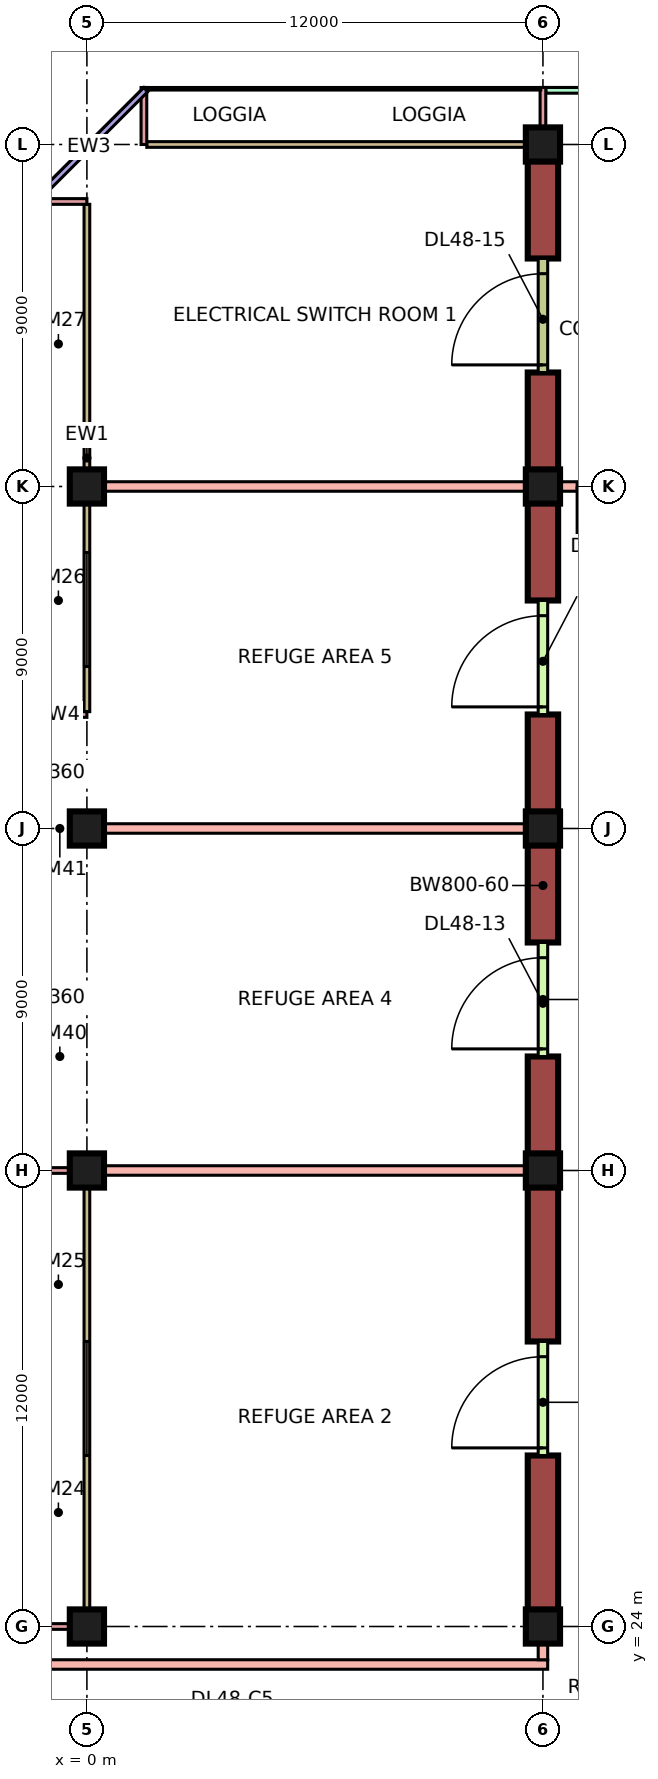
"""IFC4 building model, lengths in metres.
Left out: names, types, materials, properties, quantities, classifications, styles, units other than length and angle.
Written with IfcOpenShell. Run it as: python <this file> out.ifc"""

import sys

from ifc_helpers import new_model, si_unit, direction, frame, frame_2d, origin, origin_2d, place, context, subcontext, project, spatial, rectangle, extrude, element, fill, save


model = new_model("IFC4")
c1 = context("Model", 3, precision=1e-05, world=origin(), true_north=direction((0.0, 1.0)))
c2 = subcontext(c1, "Body", "Model", "MODEL_VIEW")
j1 = project(units=[si_unit("LENGTHUNIT", "METRE"), si_unit("PLANEANGLEUNIT", "RADIAN")], contexts=[c1])
p1 = place(None, origin())
s1 = spatial("IfcSite", under=j1, at=p1, CompositionType="ELEMENT")
p2 = place(p1, origin())
s2 = spatial("IfcBuilding", under=s1, at=p2, CompositionType="ELEMENT")
p3 = place(p2, frame((0.0, 0.0, 206.15)))
s3 = spatial("IfcBuildingStorey", under=s2, at=p3, CompositionType="ELEMENT", Elevation=206.15)
p4 = place(p3, frame((0.0, 24.0, 0.0), z_axis=(0.0, 0.0, 1.0), x_axis=(1.0, 0.0, 0.0)))
e1 = element("IfcColumn", 1, at=p4, inside=s3, PredefinedType="COLUMN", context=c2, shape_type="SweptSolid", body=[
    extrude(rectangle(XDim=0.9, YDim=0.9, at=origin_2d()), origin(), (0.0, 0.0, 1.0), 5.5),
])
p5 = place(p3, frame((0.0, 36.0, 0.0), z_axis=(0.0, 0.0, 1.0), x_axis=(1.0, 0.0, 0.0)))
e2 = element("IfcColumn", 2, at=p5, inside=s3, PredefinedType="COLUMN", context=c2, shape_type="SweptSolid", body=[
    extrude(rectangle(XDim=0.9, YDim=0.9, at=origin_2d()), origin(), (0.0, 0.0, 1.0), 5.5),
])
p6 = place(p3, frame((0.0, 45.0, 0.0), z_axis=(0.0, 0.0, 1.0), x_axis=(1.0, 0.0, 0.0)))
e3 = element("IfcColumn", 3, at=p6, inside=s3, PredefinedType="COLUMN", context=c2, shape_type="SweptSolid", body=[
    extrude(rectangle(XDim=0.9, YDim=0.9, at=origin_2d()), origin(), (0.0, 0.0, 1.0), 5.5),
])
for number, where, z_axis, x_axis in (
    (4, (0.0, 54.0, 0.0), (0.0, 0.0, 1.0), (1.0, 0.0, 0.0)),
    (5, (12.0, 24.0, 0.0), (0.0, 0.0, 1.0), (1.0, 0.0, 0.0)),
    (6, (12.0, 36.0, 0.0), (0.0, 0.0, 1.0), (1.0, 0.0, 0.0)),
    (7, (12.0, 45.0, 0.0), (0.0, 0.0, 1.0), (1.0, 0.0, 0.0)),
    (8, (12.0, 54.0, 0.0), (0.0, 0.0, 1.0), (1.0, 0.0, 0.0)),
    (9, (12.0, 63.0, 0.0), (0.0, 0.0, 1.0), (1.0, 0.0, 0.0)),
):
    element("IfcColumn", number, at=place(p3, frame(where, z_axis=z_axis, x_axis=x_axis)), inside=s3, PredefinedType="COLUMN", context=c2, shape_type="SweptSolid", body=[
        extrude(rectangle(XDim=0.9, YDim=0.9, at=origin_2d()), origin(), (0.0, 0.0, 1.0), 5.5),
    ])
for number, where, z_axis, x_axis in (
    (10, (12.0, 24.0, 0.0), (0.0, 0.0, 1.0), (0.0, 1.0, 0.0)),
    (11, (12.0, 31.5, 0.0), (0.0, 0.0, 1.0), (0.0, 1.0, 0.0)),
):
    element("IfcWall", number, at=place(p3, frame(where, z_axis=z_axis, x_axis=x_axis)), inside=s3, PredefinedType="SHEAR", context=c2, shape_type="SweptSolid", body=[
        extrude(rectangle(XDim=4.5, YDim=0.8, at=frame_2d((2.25, 0.0))), origin(), (0.0, 0.0, 1.0), 5.1),
    ])
for number, where, z_axis, x_axis in (
    (12, (12.0, 36.0, 0.0), (0.0, 0.0, 1.0), (0.0, 1.0, 0.0)),
    (13, (12.0, 42.0, 0.0), (0.0, 0.0, 1.0), (0.0, 1.0, 0.0)),
    (14, (12.0, 45.0, 0.0), (0.0, 0.0, 1.0), (0.0, 1.0, 0.0)),
    (15, (12.0, 51.0, 0.0), (0.0, 0.0, 1.0), (0.0, 1.0, 0.0)),
    (16, (12.0, 54.0, 0.0), (0.0, 0.0, 1.0), (0.0, 1.0, 0.0)),
    (17, (12.0, 60.0, 0.0), (0.0, 0.0, 1.0), (0.0, 1.0, 0.0)),
):
    element("IfcWall", number, at=place(p3, frame(where, z_axis=z_axis, x_axis=x_axis)), inside=s3, PredefinedType="SHEAR", context=c2, shape_type="SweptSolid", body=[
        extrude(rectangle(XDim=3.0, YDim=0.8, at=frame_2d((1.5, 0.0))), origin(), (0.0, 0.0, 1.0), 5.1),
    ])
p7 = place(p3, frame((22.5, 64.425, 0.0), z_axis=(0.0, 0.0, 1.0), x_axis=(-1.0, 0.0, 0.0)))
e18 = element("IfcWall", 18, at=p7, inside=s3, PredefinedType="SOLIDWALL", context=c2, shape_type="SweptSolid", body=[
    extrude(rectangle(XDim=10.425, YDim=0.15, at=frame_2d((5.212, 0.0))), origin(), (0.0, 0.0, 1.0), 5.1),
])
p8 = place(p3, frame((11.925, 63.0, 0.0), z_axis=(0.0, 0.0, 1.0), x_axis=(-1.0, 0.0, 0.0)))
e19 = element("IfcWall", 19, at=p8, inside=s3, PredefinedType="SOLIDWALL", context=c2, shape_type="SweptSolid", body=[
    extrude(rectangle(XDim=10.35, YDim=0.15, at=frame_2d((5.175, 0.0))), origin(), (0.0, 0.0, 1.0), 5.1),
])
for number, where, z_axis, x_axis in (
    (20, (12.0, 64.5, 0.0), (0.0, 0.0, 1.0), (0.0, -1.0, 0.0)),
    (21, (1.5, 64.5, 0.0), (0.0, 0.0, 1.0), (0.0, -1.0, 0.0)),
):
    element("IfcWall", number, at=place(p3, frame(where, z_axis=z_axis, x_axis=x_axis)), inside=s3, PredefinedType="SOLIDWALL", context=c2, shape_type="SweptSolid", body=[
        extrude(rectangle(XDim=1.5, YDim=0.15, at=frame_2d((0.75, 0.0))), origin(), (0.0, 0.0, 1.0), 5.1),
    ])
p9 = place(p3, frame((1.553, 64.447, 0.0), z_axis=(0.0, 0.0, 1.0), x_axis=(-0.707106781187, -0.707106781187, 0.0)))
e22 = element("IfcWall", 22, at=p9, inside=s3, PredefinedType="SOLIDWALL", context=c2, shape_type="SweptSolid", body=[
    extrude(rectangle(XDim=4.243, YDim=0.15, at=frame_2d((2.121, 0.0))), origin(), (0.0, 0.0, 1.0), 5.1),
])
p10 = place(p3, frame((0.0, 61.425, 0.0), z_axis=(0.0, 0.0, 1.0), x_axis=(0.0, -1.0, 0.0)))
e23 = element("IfcWall", 23, at=p10, inside=s3, PredefinedType="SOLIDWALL", context=c2, shape_type="SweptSolid", body=[
    extrude(rectangle(XDim=13.35, YDim=0.15, at=frame_2d((6.675, 0.0))), origin(), (0.0, 0.0, 1.0), 5.1),
])
p11 = place(p10, frame((9.163, 0.0, 0.45)))
e24 = element("IfcOpeningElement", 24, at=p11, cuts=e23, PredefinedType="OPENING", context=c2, shape_type="SweptSolid", body=[
    extrude(rectangle(XDim=3.0, YDim=3.6, at=frame_2d((1.5, 1.8))), frame((0.0, 0.085, 0.0), z_axis=(0.0, -1.0, 0.0), x_axis=(1.0, 0.0, 0.0)), (0.0, 0.0, 1.0), 0.17),
])
for number, where, z_axis, x_axis in (
    (25, (-1.5, 61.5, 0.0), (0.0, 0.0, 1.0), (1.0, 0.0, 0.0)),
    (26, (-1.5, 48.0, 0.0), (0.0, 0.0, 1.0), (1.0, 0.0, 0.0)),
):
    element("IfcWall", number, at=place(p3, frame(where, z_axis=z_axis, x_axis=x_axis)), inside=s3, PredefinedType="SOLIDWALL", context=c2, shape_type="SweptSolid", body=[
        extrude(rectangle(XDim=1.5, YDim=0.15, at=frame_2d((0.75, 0.0))), origin(), (0.0, 0.0, 1.0), 5.1),
    ])
p12 = place(p3, frame((0.0, 35.925, 0.0), z_axis=(0.0, 0.0, 1.0), x_axis=(0.0, -1.0, 0.0)))
e27 = element("IfcWall", 27, at=p12, inside=s3, PredefinedType="SOLIDWALL", context=c2, shape_type="SweptSolid", body=[
    extrude(rectangle(XDim=11.85, YDim=0.15, at=frame_2d((5.925, 0.0))), origin(), (0.0, 0.0, 1.0), 5.1),
])
p13 = place(p12, frame((4.425, 0.0, 0.45)))
e28 = element("IfcOpeningElement", 28, at=p13, cuts=e27, PredefinedType="OPENING", context=c2, shape_type="SweptSolid", body=[
    extrude(rectangle(XDim=3.0, YDim=3.6, at=frame_2d((1.5, 1.8))), frame((0.0, 0.085, 0.0), z_axis=(0.0, -1.0, 0.0), x_axis=(1.0, 0.0, 0.0)), (0.0, 0.0, 1.0), 0.17),
])
for number, where, z_axis, x_axis in (
    (29, (-1.5, 36.0, 0.0), (0.0, 0.0, 1.0), (1.0, 0.0, 0.0)),
    (30, (-1.5, 24.0, 0.0), (0.0, 0.0, 1.0), (1.0, 0.0, 0.0)),
):
    element("IfcWall", number, at=place(p3, frame(where, z_axis=z_axis, x_axis=x_axis)), inside=s3, PredefinedType="SOLIDWALL", context=c2, shape_type="SweptSolid", body=[
        extrude(rectangle(XDim=1.5, YDim=0.15, at=frame_2d((0.75, 0.0))), origin(), (0.0, 0.0, 1.0), 5.1),
    ])
p14 = place(p3, frame((-1.35, 23.0, 0.0), z_axis=(0.0, 0.0, 1.0), x_axis=(1.0, 0.0, 0.0)))
e31 = element("IfcWall", 31, at=p14, inside=s3, PredefinedType="PARTITIONING", context=c2, shape_type="SweptSolid", body=[
    extrude(rectangle(XDim=13.475, YDim=0.25, at=frame_2d((6.738, 0.0))), origin(), (0.0, 0.0, 1.0), 5.1),
])
e32 = element("IfcWall", 32, at=p5, inside=s3, PredefinedType="PARTITIONING", context=c2, shape_type="SweptSolid", body=[
    extrude(rectangle(XDim=11.601, YDim=0.25, at=frame_2d((5.801, 0.0))), origin(), (0.0, 0.0, 1.0), 5.1),
])
e33 = element("IfcWall", 33, at=p6, inside=s3, PredefinedType="PARTITIONING", context=c2, shape_type="SweptSolid", body=[
    extrude(rectangle(XDim=11.601, YDim=0.25, at=frame_2d((5.801, 0.0))), origin(), (0.0, 0.0, 1.0), 5.1),
])
p15 = place(p3, frame((0.074, 54.0, 0.0), z_axis=(0.0, 0.0, 1.0), x_axis=(1.0, 0.0, 0.0)))
e34 = element("IfcWall", 34, at=p15, inside=s3, PredefinedType="PARTITIONING", context=c2, shape_type="SweptSolid", body=[
    extrude(rectangle(XDim=11.527, YDim=0.25, at=frame_2d((5.764, 0.0))), origin(), (0.0, 0.0, 1.0), 5.1),
])
p16 = place(p3, frame((12.0, 23.125, 0.0), z_axis=(0.0, 0.0, 1.0), x_axis=(0.0, 1.0, 0.0)))
e35 = element("IfcWall", 35, at=p16, inside=s3, PredefinedType="PARTITIONING", context=c2, shape_type="SweptSolid", body=[
    extrude(rectangle(XDim=0.876, YDim=0.25, at=frame_2d((0.438, 0.0))), origin(), (0.0, 0.0, 1.0), 5.1),
])
p17 = place(p3, frame((12.0, 28.499, 0.0), z_axis=(0.0, 0.0, 1.0), x_axis=(0.0, 1.0, 0.0)))
e36 = element("IfcWall", 36, at=p17, inside=s3, PredefinedType="PARTITIONING", context=c2, shape_type="SweptSolid", body=[
    extrude(rectangle(XDim=3.002, YDim=0.25, at=frame_2d((1.501, 0.0))), origin(), (0.0, 0.0, 1.0), 3.05),
])
p18 = place(p17, frame((0.201, 0.0, 0.0)))
e37 = element("IfcOpeningElement", 37, at=p18, cuts=e36, PredefinedType="OPENING", context=c2, shape_type="SweptSolid", body=[
    extrude(rectangle(XDim=2.4, YDim=2.1, at=frame_2d((1.2, 1.05))), frame((0.0, 0.135, 0.0), z_axis=(0.0, -1.0, 0.0), x_axis=(1.0, 0.0, 0.0)), (0.0, 0.0, 1.0), 0.27),
])
p19 = place(p3, frame((12.0, 38.999, 0.0), z_axis=(0.0, 0.0, 1.0), x_axis=(0.0, 1.0, 0.0)))
e38 = element("IfcWall", 38, at=p19, inside=s3, PredefinedType="PARTITIONING", context=c2, shape_type="SweptSolid", body=[
    extrude(rectangle(XDim=3.002, YDim=0.25, at=frame_2d((1.501, 0.0))), origin(), (0.0, 0.0, 1.0), 3.05),
])
p20 = place(p19, frame((0.201, 0.0, 0.0)))
e39 = element("IfcOpeningElement", 39, at=p20, cuts=e38, PredefinedType="OPENING", context=c2, shape_type="SweptSolid", body=[
    extrude(rectangle(XDim=2.4, YDim=2.1, at=frame_2d((1.2, 1.05))), frame((0.0, 0.135, 0.0), z_axis=(0.0, -1.0, 0.0), x_axis=(1.0, 0.0, 0.0)), (0.0, 0.0, 1.0), 0.27),
])
p21 = place(p3, frame((12.0, 47.999, 0.0), z_axis=(0.0, 0.0, 1.0), x_axis=(0.0, 1.0, 0.0)))
e40 = element("IfcWall", 40, at=p21, inside=s3, PredefinedType="PARTITIONING", context=c2, shape_type="SweptSolid", body=[
    extrude(rectangle(XDim=3.002, YDim=0.25, at=frame_2d((1.501, 0.0))), origin(), (0.0, 0.0, 1.0), 3.05),
])
p22 = place(p21, frame((0.201, 0.0, 0.0)))
e41 = element("IfcOpeningElement", 41, at=p22, cuts=e40, PredefinedType="OPENING", context=c2, shape_type="SweptSolid", body=[
    extrude(rectangle(XDim=2.4, YDim=2.1, at=frame_2d((1.2, 1.05))), frame((0.0, 0.135, 0.0), z_axis=(0.0, -1.0, 0.0), x_axis=(1.0, 0.0, 0.0)), (0.0, 0.0, 1.0), 0.27),
])
p23 = place(p3, frame((12.0, 56.999, 0.0), z_axis=(0.0, 0.0, 1.0), x_axis=(0.0, 1.0, 0.0)))
e42 = element("IfcWall", 42, at=p23, inside=s3, PredefinedType="PARTITIONING", context=c2, shape_type="SweptSolid", body=[
    extrude(rectangle(XDim=3.002, YDim=0.25, at=frame_2d((1.501, 0.0))), origin(), (0.0, 0.0, 1.0), 3.05),
])
p24 = place(p23, frame((0.201, 0.0, 0.0)))
e43 = element("IfcOpeningElement", 43, at=p24, cuts=e42, PredefinedType="OPENING", context=c2, shape_type="SweptSolid", body=[
    extrude(rectangle(XDim=2.4, YDim=2.1, at=frame_2d((1.2, 1.05))), frame((0.0, 0.135, 0.0), z_axis=(0.0, -1.0, 0.0), x_axis=(1.0, 0.0, 0.0)), (0.0, 0.0, 1.0), 0.27),
])
p25 = place(p3, frame((12.399, 54.0, 0.0), z_axis=(0.0, 0.0, 1.0), x_axis=(1.0, 0.0, 0.0)))
e44 = element("IfcWall", 44, at=p25, inside=s3, PredefinedType="PARTITIONING", context=c2, shape_type="SweptSolid", body=[
    extrude(rectangle(XDim=3.076, YDim=0.25, at=frame_2d((1.538, 0.0))), origin(), (0.0, 0.0, 1.0), 5.1),
])
p26 = place(p25, frame((0.501, 0.0, 0.0)))
e45 = element("IfcOpeningElement", 45, at=p26, cuts=e44, PredefinedType="OPENING", context=c2, shape_type="SweptSolid", body=[
    extrude(rectangle(XDim=1.8, YDim=2.1, at=frame_2d((0.9, 1.05))), frame((0.0, 0.135, 0.0), z_axis=(0.0, -1.0, 0.0), x_axis=(1.0, 0.0, 0.0)), (0.0, 0.0, 1.0), 0.27),
])
p27 = place(p11, origin())
e46 = element("IfcWindow", 46, at=p27, inside=s3, PartitioningType="SINGLE_PANEL", PredefinedType="WINDOW", context=c2, shape_type="SweptSolid", body=[
    extrude(rectangle(XDim=3.0, YDim=3.6, at=frame_2d((1.5, 1.8))), frame((0.0, 0.03, 0.0), z_axis=(0.0, -1.0, 0.0), x_axis=(1.0, 0.0, 0.0)), (0.0, 0.0, 1.0), 0.06),
])
fill(e24, e46)
p28 = place(p13, origin())
e47 = element("IfcWindow", 47, at=p28, inside=s3, PartitioningType="SINGLE_PANEL", PredefinedType="WINDOW", context=c2, shape_type="SweptSolid", body=[
    extrude(rectangle(XDim=3.0, YDim=3.6, at=frame_2d((1.5, 1.8))), frame((0.0, 0.03, 0.0), z_axis=(0.0, -1.0, 0.0), x_axis=(1.0, 0.0, 0.0)), (0.0, 0.0, 1.0), 0.06),
])
fill(e28, e47)
p29 = place(p18, origin())
e48 = element("IfcDoor", 48, at=p29, inside=s3, OperationType="DOUBLE_DOOR_SINGLE_SWING", PredefinedType="DOOR", context=c2, shape_type="SweptSolid", body=[
    extrude(rectangle(XDim=2.4, YDim=2.1, at=frame_2d((1.2, 1.05))), frame((0.0, 0.025, 0.0), z_axis=(0.0, -1.0, 0.0), x_axis=(1.0, 0.0, 0.0)), (0.0, 0.0, 1.0), 0.05),
])
fill(e37, e48)
p30 = place(p20, origin())
e49 = element("IfcDoor", 49, at=p30, inside=s3, OperationType="DOUBLE_DOOR_SINGLE_SWING", PredefinedType="DOOR", context=c2, shape_type="SweptSolid", body=[
    extrude(rectangle(XDim=2.4, YDim=2.1, at=frame_2d((1.2, 1.05))), frame((0.0, 0.025, 0.0), z_axis=(0.0, -1.0, 0.0), x_axis=(1.0, 0.0, 0.0)), (0.0, 0.0, 1.0), 0.05),
])
fill(e39, e49)
p31 = place(p22, origin())
e50 = element("IfcDoor", 50, at=p31, inside=s3, OperationType="DOUBLE_DOOR_SINGLE_SWING", PredefinedType="DOOR", context=c2, shape_type="SweptSolid", body=[
    extrude(rectangle(XDim=2.4, YDim=2.1, at=frame_2d((1.2, 1.05))), frame((0.0, 0.025, 0.0), z_axis=(0.0, -1.0, 0.0), x_axis=(1.0, 0.0, 0.0)), (0.0, 0.0, 1.0), 0.05),
])
fill(e41, e50)
p32 = place(p24, origin())
e51 = element("IfcDoor", 51, at=p32, inside=s3, OperationType="DOUBLE_DOOR_SINGLE_SWING", PredefinedType="DOOR", context=c2, shape_type="SweptSolid", body=[
    extrude(rectangle(XDim=2.4, YDim=2.1, at=frame_2d((1.2, 1.05))), frame((0.0, 0.025, 0.0), z_axis=(0.0, -1.0, 0.0), x_axis=(1.0, 0.0, 0.0)), (0.0, 0.0, 1.0), 0.05),
])
fill(e43, e51)
p33 = place(p26, frame((1.8, 0.0, 0.0), z_axis=(0.0, 0.0, 1.0), x_axis=(-1.0, 0.0, 0.0)))
e52 = element("IfcDoor", 52, at=p33, inside=s3, OperationType="DOUBLE_DOOR_SINGLE_SWING", PredefinedType="DOOR", context=c2, shape_type="SweptSolid", body=[
    extrude(rectangle(XDim=1.8, YDim=2.1, at=frame_2d((0.9, 1.05))), frame((0.0, 0.025, 0.0), z_axis=(0.0, -1.0, 0.0), x_axis=(1.0, 0.0, 0.0)), (0.0, 0.0, 1.0), 0.05),
])
fill(e45, e52)
save(model, sys.argv[1])
